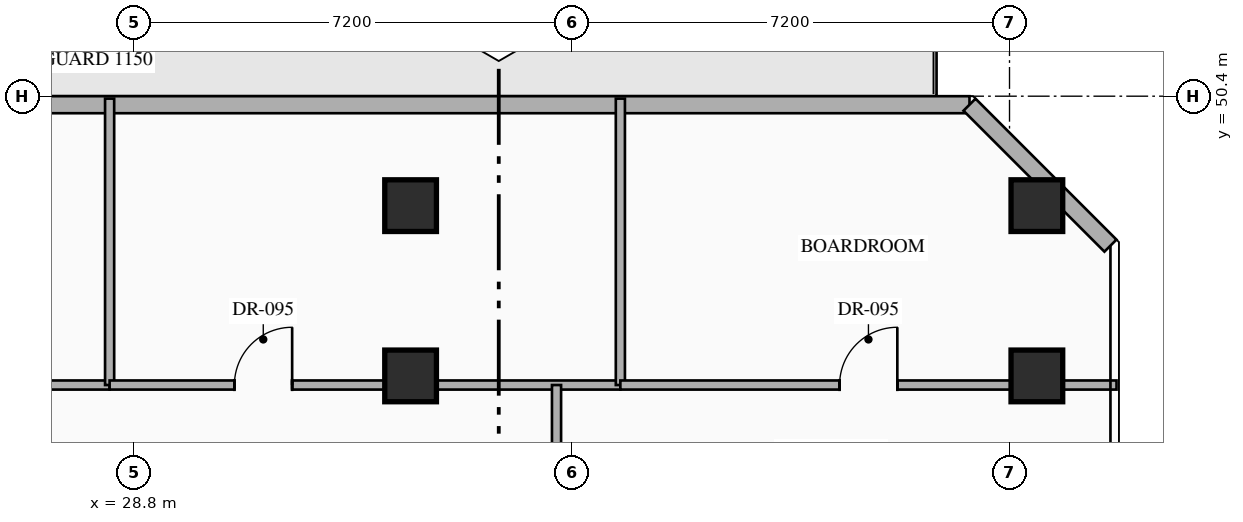
"""IFC4 building model, lengths in metres.
Left out: names, types, materials, properties, quantities, classifications, styles, units other than length and angle.
Written with IfcOpenShell. Run it as: python <this file> out.ifc"""

import sys

from ifc_helpers import new_model, si_unit, direction, frame, frame_2d, origin, origin_2d, place, context, subcontext, project, spatial, rectangle, hollow_rectangle, extrude, element, fill, save


model = new_model("IFC4")
c1 = context("Model", 3, precision=1e-05, world=origin(), true_north=direction((0.0, 1.0)))
c2 = subcontext(c1, "Body", "Model", "MODEL_VIEW")
j1 = project(units=[si_unit("LENGTHUNIT", "METRE"), si_unit("PLANEANGLEUNIT", "RADIAN")], contexts=[c1])
p1 = place(None, origin())
s1 = spatial("IfcSite", under=j1, at=p1, CompositionType="ELEMENT")
p2 = place(p1, origin())
s2 = spatial("IfcBuilding", under=s1, at=p2, CompositionType="ELEMENT")
p3 = place(p2, frame((0.0, 0.0, 142.05)))
s3 = spatial("IfcBuildingStorey", under=s2, at=p3, CompositionType="ELEMENT", Elevation=142.05)
for number, where, z_axis, x_axis in (
    (1, (33.35, 45.8, 0.0), (0.0, 0.0, 1.0), (1.0, 0.0, 0.0)),
    (2, (43.65, 45.8, 0.0), (0.0, 0.0, 1.0), (1.0, 0.0, 0.0)),
    (3, (33.35, 48.6, 0.0), (0.0, 0.0, 1.0), (1.0, 0.0, 0.0)),
    (4, (43.65, 48.6, 0.0), (0.0, 0.0, 1.0), (1.0, 0.0, 0.0)),
):
    element("IfcColumn", number, at=place(p3, frame(where, z_axis=z_axis, x_axis=x_axis)), inside=s3, PredefinedType="COLUMN", context=c2, shape_type="SweptSolid", body=[
        extrude(hollow_rectangle(XDim=0.85, YDim=0.85, WallThickness=0.032, at=origin_2d()), origin(), (0.0, 0.0, 1.0), 3.6),
    ])
p4 = place(p3, frame((12.058, 50.26, 0.0), z_axis=(0.0, 0.0, 1.0), x_axis=(1.0, 0.0, 0.0)))
e5 = element("IfcWall", 5, at=p4, inside=s3, PredefinedType="STANDARD", context=c2, shape_type="SweptSolid", body=[
    extrude(rectangle(XDim=30.484, YDim=0.28, at=frame_2d((15.242, 0.0))), origin(), (0.0, 0.0, 1.0), 3.35),
])
p5 = place(p4, frame((10.424, 0.0, 0.0)))
e6 = element("IfcOpeningElement", 6, at=p5, cuts=e5, PredefinedType="OPENING", context=c2, shape_type="SweptSolid", body=[
    extrude(rectangle(XDim=1.1, YDim=2.2, at=frame_2d((0.55, 1.1))), frame((0.0, 0.15, 0.0), z_axis=(0.0, -1.0, 0.0), x_axis=(1.0, 0.0, 0.0)), (0.0, 0.0, 1.0), 0.3),
])
p6 = place(p3, frame((42.542, 50.26, 0.0), z_axis=(0.0, 0.0, 1.0), x_axis=(0.707106781187, -0.707106781187, 0.0)))
e7 = element("IfcWall", 7, at=p6, inside=s3, PredefinedType="STANDARD", context=c2, shape_type="SweptSolid", body=[
    extrude(rectangle(XDim=3.278, YDim=0.28, at=frame_2d((1.639, 0.0))), origin(), (0.0, 0.0, 1.0), 3.35),
])
p7 = place(p3, frame((20.9, 45.65, 0.0), z_axis=(0.0, 0.0, 1.0), x_axis=(1.0, 0.0, 0.0)))
e8 = element("IfcWall", 8, at=p7, inside=s3, PredefinedType="PARTITIONING", context=c2, shape_type="SweptSolid", body=[
    extrude(rectangle(XDim=7.5, YDim=0.15, at=frame_2d((3.75, 0.0))), origin(), (0.0, 0.0, 1.0), 2.695),
])
p8 = place(p7, frame((1.827, 0.0, 0.0)))
e9 = element("IfcOpeningElement", 9, at=p8, cuts=e8, PredefinedType="OPENING", context=c2, shape_type="SweptSolid", body=[
    extrude(rectangle(XDim=0.95, YDim=2.15, at=frame_2d((0.475, 1.075))), frame((0.0, 0.085, 0.0), z_axis=(0.0, -1.0, 0.0), x_axis=(1.0, 0.0, 0.0)), (0.0, 0.0, 1.0), 0.17),
])
p9 = place(p3, frame((28.4, 45.65, 0.0), z_axis=(0.0, 0.0, 1.0), x_axis=(0.0, 1.0, 0.0)))
e10 = element("IfcWall", 10, at=p9, inside=s3, PredefinedType="PARTITIONING", context=c2, shape_type="SweptSolid", body=[
    extrude(rectangle(XDim=4.71, YDim=0.15, at=frame_2d((2.355, 0.0))), origin(), (0.0, 0.0, 1.0), 3.35),
])
p10 = place(p3, frame((28.4, 45.65, 0.0), z_axis=(0.0, 0.0, 1.0), x_axis=(1.0, 0.0, 0.0)))
e11 = element("IfcWall", 11, at=p10, inside=s3, PredefinedType="PARTITIONING", context=c2, shape_type="SweptSolid", body=[
    extrude(rectangle(XDim=8.4, YDim=0.15, at=frame_2d((4.2, 0.0))), origin(), (0.0, 0.0, 1.0), 2.695),
])
p11 = place(p10, frame((2.052, 0.0, 0.0)))
e12 = element("IfcOpeningElement", 12, at=p11, cuts=e11, PredefinedType="OPENING", context=c2, shape_type="SweptSolid", body=[
    extrude(rectangle(XDim=0.95, YDim=2.15, at=frame_2d((0.475, 1.075))), frame((0.0, 0.085, 0.0), z_axis=(0.0, -1.0, 0.0), x_axis=(1.0, 0.0, 0.0)), (0.0, 0.0, 1.0), 0.17),
])
p12 = place(p3, frame((36.8, 45.65, 0.0), z_axis=(0.0, 0.0, 1.0), x_axis=(0.0, 1.0, 0.0)))
e13 = element("IfcWall", 13, at=p12, inside=s3, PredefinedType="PARTITIONING", context=c2, shape_type="SweptSolid", body=[
    extrude(rectangle(XDim=4.71, YDim=0.15, at=frame_2d((2.355, 0.0))), origin(), (0.0, 0.0, 1.0), 3.35),
])
p13 = place(p3, frame((36.8, 45.65, 0.0), z_axis=(0.0, 0.0, 1.0), x_axis=(1.0, 0.0, 0.0)))
e14 = element("IfcWall", 14, at=p13, inside=s3, PredefinedType="PARTITIONING", context=c2, shape_type="SweptSolid", body=[
    extrude(rectangle(XDim=8.16, YDim=0.15, at=frame_2d((4.08, 0.0))), origin(), (0.0, 0.0, 1.0), 2.695),
])
p14 = place(p13, frame((3.605, 0.0, 0.0)))
e15 = element("IfcOpeningElement", 15, at=p14, cuts=e14, PredefinedType="OPENING", context=c2, shape_type="SweptSolid", body=[
    extrude(rectangle(XDim=0.95, YDim=2.15, at=frame_2d((0.475, 1.075))), frame((0.0, 0.085, 0.0), z_axis=(0.0, -1.0, 0.0), x_axis=(1.0, 0.0, 0.0)), (0.0, 0.0, 1.0), 0.17),
])
p15 = place(p3, frame((35.75, 42.55, 0.0), z_axis=(0.0, 0.0, 1.0), x_axis=(0.0, 1.0, 0.0)))
e16 = element("IfcWall", 16, at=p15, inside=s3, PredefinedType="PARTITIONING", context=c2, shape_type="SweptSolid", body=[
    extrude(rectangle(XDim=3.1, YDim=0.15, at=frame_2d((1.55, 0.0))), origin(), (0.0, 0.0, 1.0), 3.35),
])
p16 = place(p15, frame((1.075, 0.0, 0.0)))
e17 = element("IfcOpeningElement", 17, at=p16, cuts=e16, PredefinedType="OPENING", context=c2, shape_type="SweptSolid", body=[
    extrude(rectangle(XDim=0.95, YDim=2.15, at=frame_2d((0.475, 1.075))), frame((0.0, 0.085, 0.0), z_axis=(0.0, -1.0, 0.0), x_axis=(1.0, 0.0, 0.0)), (0.0, 0.0, 1.0), 0.17),
])
p17 = place(p11, origin())
e18 = element("IfcDoor", 18, at=p17, inside=s3, OperationType="SINGLE_SWING_RIGHT", PredefinedType="DOOR", context=c2, shape_type="SweptSolid", body=[
    extrude(rectangle(XDim=0.95, YDim=2.15, at=frame_2d((0.475, 1.075))), frame((0.0, 0.025, 0.0), z_axis=(0.0, -1.0, 0.0), x_axis=(1.0, 0.0, 0.0)), (0.0, 0.0, 1.0), 0.05),
])
fill(e12, e18)
p18 = place(p14, origin())
e19 = element("IfcDoor", 19, at=p18, inside=s3, OperationType="SINGLE_SWING_RIGHT", PredefinedType="DOOR", context=c2, shape_type="SweptSolid", body=[
    extrude(rectangle(XDim=0.95, YDim=2.15, at=frame_2d((0.475, 1.075))), frame((0.0, 0.025, 0.0), z_axis=(0.0, -1.0, 0.0), x_axis=(1.0, 0.0, 0.0)), (0.0, 0.0, 1.0), 0.05),
])
fill(e15, e19)
save(model, sys.argv[1])
